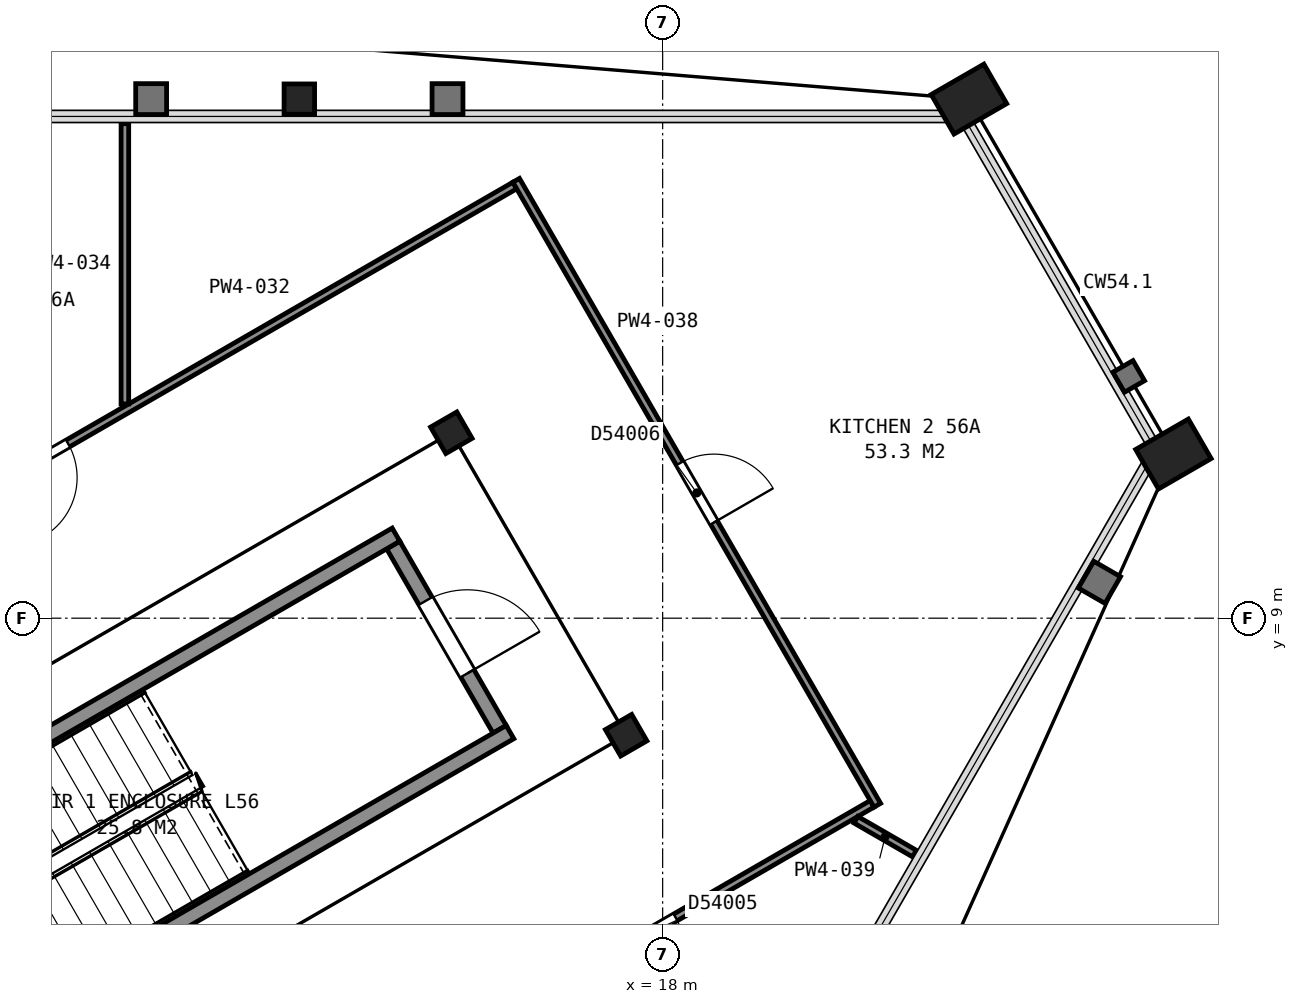
"""IFC4 building model, lengths in metres.
Left out: names, types, materials, properties, quantities, classifications, styles, units other than length and angle.
Written with IfcOpenShell. Run it as: python <this file> out.ifc"""

import sys

from ifc_helpers import new_model, si_unit, direction, frame, frame_2d, origin, origin_2d, place, context, subcontext, project, spatial, rectangle, hollow_rectangle, i_section, extrude, element, fill, save


model = new_model("IFC4")
c1 = context("Model", 3, precision=1e-05, world=origin(), true_north=direction((0.0, 1.0)))
c2 = subcontext(c1, "Body", "Model", "MODEL_VIEW")
j1 = project(units=[si_unit("LENGTHUNIT", "METRE"), si_unit("PLANEANGLEUNIT", "RADIAN")], contexts=[c1])
p1 = place(None, origin())
s1 = spatial("IfcSite", under=j1, at=p1, CompositionType="ELEMENT")
p2 = place(p1, origin())
s2 = spatial("IfcBuilding", under=s1, at=p2, CompositionType="ELEMENT")
p3 = place(p2, frame((0.0, 0.0, 224.9)))
s3 = spatial("IfcBuildingStorey", under=s2, at=p3, CompositionType="ELEMENT", Elevation=224.9)
p4 = place(p3, frame((22.03, 15.83, 0.0), z_axis=(0.0, 0.0, 1.0), x_axis=(0.5, -0.866025403784, 0.0)))
e1 = element("IfcColumn", 1, at=p4, inside=s3, PredefinedType="COLUMN", context=c2, shape_type="SweptSolid", body=[
    extrude(hollow_rectangle(XDim=0.6, YDim=0.8, WallThickness=0.05, at=origin_2d()), origin(), (0.0, 0.0, 1.0), 3.7),
])
p5 = place(p3, frame((13.22, 15.83, 0.0), z_axis=(0.0, 0.0, 1.0), x_axis=(1.0, 0.0, 0.0)))
e2 = element("IfcColumn", 2, at=p5, inside=s3, PredefinedType="COLUMN", context=c2, shape_type="SweptSolid", body=[
    extrude(i_section(OverallWidth=0.401, OverallDepth=0.399, WebThickness=0.025, FlangeThickness=0.04, FilletRadius=0.015, at=origin_2d()), origin(), (0.0, 0.0, 1.0), 3.7),
])
p6 = place(p3, frame((24.72, 11.16, 0.0), z_axis=(0.0, 0.0, 1.0), x_axis=(0.5, -0.866025403784, 0.0)))
e3 = element("IfcColumn", 3, at=p6, inside=s3, PredefinedType="COLUMN", context=c2, shape_type="SweptSolid", body=[
    extrude(hollow_rectangle(XDim=0.6, YDim=0.8, WallThickness=0.05, at=origin_2d()), origin(), (0.0, 0.0, 1.0), 3.7),
])
for number, where, z_axis, x_axis in (
    (4, (17.52, 7.46, 0.0), (0.0, 0.0, 1.0), (0.5, -0.866, 0.0)),
    (5, (15.22, 11.44, 0.0), (0.0, 0.0, 1.0), (0.5, -0.866, 0.0)),
):
    element("IfcColumn", number, at=place(p3, frame(where, z_axis=z_axis, x_axis=x_axis)), inside=s3, PredefinedType="COLUMN", context=c2, shape_type="SweptSolid", body=[
        extrude(i_section(OverallWidth=0.401, OverallDepth=0.399, WebThickness=0.025, FlangeThickness=0.04, FilletRadius=0.015, at=origin_2d()), origin(), (0.0, 0.0, 1.0), 3.7),
    ])
p7 = place(p3, frame((15.855, 7.538, 0.0), z_axis=(0.0, 0.0, 1.0), x_axis=(-0.500049511043, 0.865996816683, 0.0)))
e6 = element("IfcWall", 6, at=p7, inside=s3, PredefinedType="PARTITIONING", context=c2, shape_type="SweptSolid", body=[
    extrude(rectangle(XDim=2.8, YDim=0.2, at=frame_2d((1.4, 0.0))), origin(), (0.0, 0.0, 1.0), 3.45),
])
p8 = place(p7, frame((0.85, 0.0, 0.0)))
e7 = element("IfcOpeningElement", 7, at=p8, cuts=e6, PredefinedType="OPENING", context=c2, shape_type="SweptSolid", body=[
    extrude(rectangle(XDim=1.1, YDim=2.1, at=frame_2d((0.55, 1.05))), frame((0.0, 0.11, 0.0), z_axis=(0.0, -1.0, 0.0), x_axis=(1.0, 0.0, 0.0)), (0.0, 0.0, 1.0), 0.22),
])
for number, where, z_axis, x_axis in (
    (8, (6.178, 5.299, 0.0), (0.0, 0.0, 1.0), (0.866, 0.5, 0.0)),
    (9, (7.678, 2.701, 0.0), (0.0, 0.0, 1.0), (0.866, 0.5, 0.0)),
):
    element("IfcWall", number, at=place(p3, frame(where, z_axis=z_axis, x_axis=x_axis)), inside=s3, PredefinedType="PARTITIONING", context=c2, shape_type="SweptSolid", body=[
        extrude(rectangle(XDim=9.6, YDim=0.2, at=frame_2d((4.8, 0.0))), origin(), (0.0, 0.0, 1.0), 3.45),
    ])
p9 = place(p3, frame((8.691, 10.442, 0.0), z_axis=(0.0, 0.0, 1.0), x_axis=(0.866070360466, 0.499922124658, 0.0)))
e10 = element("IfcWall", 10, at=p9, inside=s3, PredefinedType="PARTITIONING", context=c2, shape_type="SweptSolid", body=[
    extrude(rectangle(XDim=8.503, YDim=0.1, at=frame_2d((4.251, 0.0))), origin(), (0.0, 0.0, 1.0), 2.713),
])
p10 = place(p9, frame((0.815, 0.0, 0.0)))
e11 = element("IfcOpeningElement", 11, at=p10, cuts=e10, PredefinedType="OPENING", context=c2, shape_type="SweptSolid", body=[
    extrude(rectangle(XDim=0.9, YDim=2.1, at=frame_2d((0.45, 1.05))), frame((0.0, 0.06, 0.0), z_axis=(0.0, -1.0, 0.0), x_axis=(1.0, 0.0, 0.0)), (0.0, 0.0, 1.0), 0.12),
])
p11 = place(p3, frame((10.925, 11.819, 0.0), z_axis=(0.0, 0.0, 1.0), x_axis=(0.0, 1.0, 0.0)))
e12 = element("IfcWall", 12, at=p11, inside=s3, PredefinedType="PARTITIONING", context=c2, shape_type="SweptSolid", body=[
    extrude(rectangle(XDim=3.688, YDim=0.1, at=frame_2d((1.844, 0.0))), origin(), (0.0, 0.0, 1.0), 2.713),
])
p12 = place(p3, frame((20.756, 6.557, 0.0), z_axis=(0.0, 0.0, 1.0), x_axis=(-0.866069146081, -0.499924228466, 0.0)))
e13 = element("IfcWall", 13, at=p12, inside=s3, PredefinedType="PARTITIONING", context=c2, shape_type="SweptSolid", body=[
    extrude(rectangle(XDim=8.519, YDim=0.1, at=frame_2d((4.259, 0.0))), origin(), (0.0, 0.0, 1.0), 2.713),
])
p13 = place(p12, frame((2.986, 0.0, 0.0)))
e14 = element("IfcOpeningElement", 14, at=p13, cuts=e13, PredefinedType="OPENING", context=c2, shape_type="SweptSolid", body=[
    extrude(rectangle(XDim=0.9, YDim=2.1, at=frame_2d((0.45, 1.05))), frame((0.0, 0.06, 0.0), z_axis=(0.0, -1.0, 0.0), x_axis=(1.0, 0.0, 0.0)), (0.0, 0.0, 1.0), 0.12),
])
p14 = place(p3, frame((16.073, 14.761, 0.0), z_axis=(0.0, 0.0, 1.0), x_axis=(0.500297300687, -0.865853689098, 0.0)))
e15 = element("IfcWall", 15, at=p14, inside=s3, PredefinedType="PARTITIONING", context=c2, shape_type="SweptSolid", body=[
    extrude(rectangle(XDim=9.496, YDim=0.1, at=frame_2d((4.748, 0.0))), origin(), (0.0, 0.0, 1.0), 2.713),
])
p15 = place(p14, frame((4.3, 0.0, 0.0)))
e16 = element("IfcOpeningElement", 16, at=p15, cuts=e15, PredefinedType="OPENING", context=c2, shape_type="SweptSolid", body=[
    extrude(rectangle(XDim=0.9, YDim=2.1, at=frame_2d((0.45, 1.05))), frame((0.0, 0.06, 0.0), z_axis=(0.0, -1.0, 0.0), x_axis=(1.0, 0.0, 0.0)), (0.0, 0.0, 1.0), 0.12),
])
p16 = place(p3, frame((20.543, 6.348, 0.0), z_axis=(0.0, 0.0, 1.0), x_axis=(0.865952303503, -0.500126592033, 0.0)))
e17 = element("IfcWall", 17, at=p16, inside=s3, PredefinedType="PARTITIONING", context=c2, shape_type="SweptSolid", body=[
    extrude(rectangle(XDim=0.889, YDim=0.1, at=frame_2d((0.444, 0.0))), origin(), (0.0, 0.0, 1.0), 2.713),
])
p17 = place(p8, origin())
e18 = element("IfcDoor", 18, at=p17, inside=s3, OperationType="SINGLE_SWING_LEFT", PredefinedType="DOOR", context=c2, shape_type="SweptSolid", body=[
    extrude(rectangle(XDim=1.1, YDim=2.1, at=frame_2d((0.55, 1.05))), frame((0.0, 0.025, 0.0), z_axis=(0.0, -1.0, 0.0), x_axis=(1.0, 0.0, 0.0)), (0.0, 0.0, 1.0), 0.05),
])
fill(e7, e18)
p18 = place(p10, origin())
e19 = element("IfcDoor", 19, at=p18, inside=s3, OperationType="SINGLE_SWING_LEFT", PredefinedType="DOOR", context=c2, shape_type="SweptSolid", body=[
    extrude(rectangle(XDim=0.9, YDim=2.1, at=frame_2d((0.45, 1.05))), frame((0.0, 0.025, 0.0), z_axis=(0.0, -1.0, 0.0), x_axis=(1.0, 0.0, 0.0)), (0.0, 0.0, 1.0), 0.05),
])
fill(e11, e19)
p19 = place(p13, origin())
e20 = element("IfcDoor", 20, at=p19, inside=s3, OperationType="SINGLE_SWING_RIGHT", PredefinedType="DOOR", context=c2, shape_type="SweptSolid", body=[
    extrude(rectangle(XDim=0.9, YDim=2.1, at=frame_2d((0.45, 1.05))), frame((0.0, 0.025, 0.0), z_axis=(0.0, -1.0, 0.0), x_axis=(1.0, 0.0, 0.0)), (0.0, 0.0, 1.0), 0.05),
])
fill(e14, e20)
p20 = place(p15, origin())
e21 = element("IfcDoor", 21, at=p20, inside=s3, OperationType="SINGLE_SWING_RIGHT", PredefinedType="DOOR", context=c2, shape_type="SweptSolid", body=[
    extrude(rectangle(XDim=0.9, YDim=2.1, at=frame_2d((0.45, 1.05))), frame((0.0, 0.025, 0.0), z_axis=(0.0, -1.0, 0.0), x_axis=(1.0, 0.0, 0.0)), (0.0, 0.0, 1.0), 0.05),
])
fill(e16, e21)
save(model, sys.argv[1])
